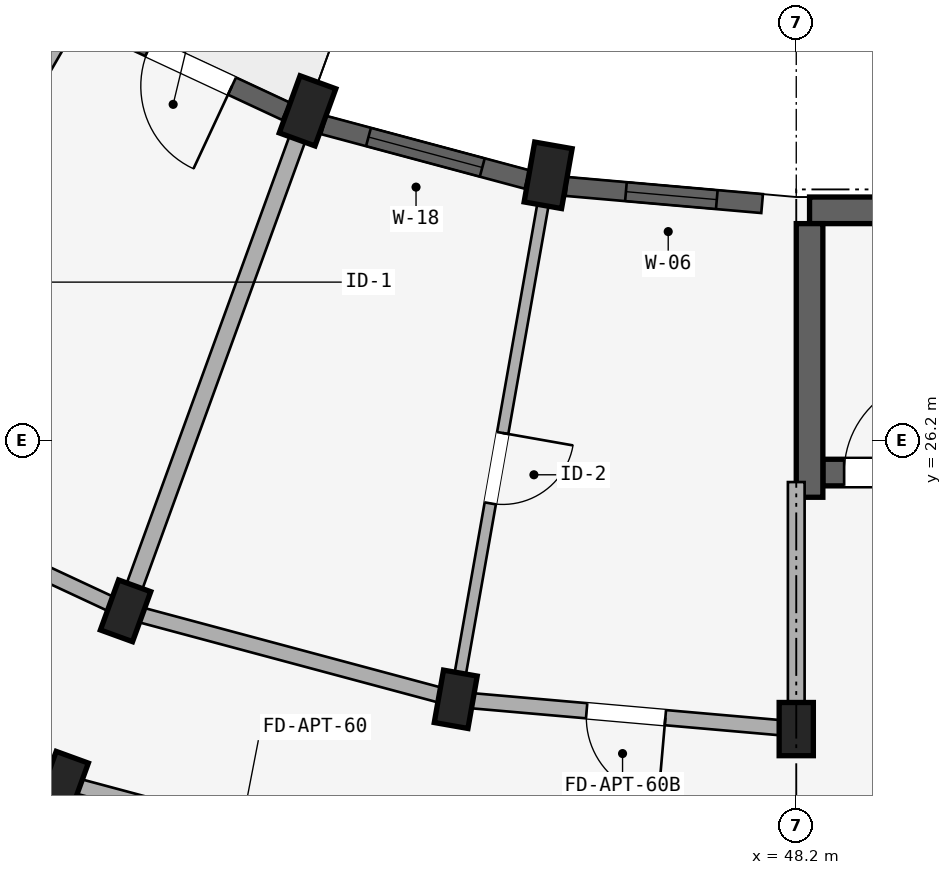
"""IFC4 building model, lengths in metres.
Left out: names, types, materials, properties, quantities, classifications, styles, units other than length and angle.
Written with IfcOpenShell. Run it as: python <this file> out.ifc"""

import sys

from ifc_helpers import new_model, si_unit, direction, frame, frame_2d, origin, origin_2d, place, context, subcontext, project, spatial, rectangle, extrude, element, fill, save


model = new_model("IFC4")
c1 = context("Model", 3, precision=1e-05, world=origin(), true_north=direction((0.0, 1.0)))
c2 = subcontext(c1, "Body", "Model", "MODEL_VIEW")
j1 = project(units=[si_unit("LENGTHUNIT", "METRE"), si_unit("PLANEANGLEUNIT", "RADIAN")], contexts=[c1])
p1 = place(None, origin())
s1 = spatial("IfcSite", under=j1, at=p1, CompositionType="ELEMENT")
p2 = place(p1, origin())
s2 = spatial("IfcBuilding", under=s1, at=p2, CompositionType="ELEMENT")
p3 = place(p2, frame((0.0, 0.0, 18.15)))
s3 = spatial("IfcBuildingStorey", under=s2, at=p3, CompositionType="ELEMENT", Elevation=18.15)
p4 = place(p3, frame((48.375, 29.225, 0.0), z_axis=(0.0, 0.0, 1.0), x_axis=(1.0, 0.0, 0.0)))
e1 = element("IfcWall", 1, at=p4, inside=s3, PredefinedType="SHEAR", context=c2, shape_type="SweptSolid", body=[
    extrude(rectangle(XDim=8.25, YDim=0.35, at=frame_2d((4.125, 0.0))), origin(), (0.0, 0.0, 1.0), 2.93),
])
p5 = place(p3, frame((48.55, 25.775, 0.0), z_axis=(0.0, 0.0, 1.0), x_axis=(1.0, 0.0, 0.0)))
e2 = element("IfcWall", 2, at=p5, inside=s3, PredefinedType="SHEAR", context=c2, shape_type="SweptSolid", body=[
    extrude(rectangle(XDim=7.9, YDim=0.35, at=frame_2d((3.95, 0.0))), origin(), (0.0, 0.0, 1.0), 2.93),
])
p6 = place(p5, frame((0.28, 0.0, 0.0)))
e3 = element("IfcOpeningElement", 3, at=p6, cuts=e2, PredefinedType="OPENING", context=c2, shape_type="SweptSolid", body=[
    extrude(rectangle(XDim=1.24, YDim=2.15, at=frame_2d((0.62, 1.075))), frame((0.0, 0.185, 0.0), z_axis=(0.0, -1.0, 0.0), x_axis=(1.0, 0.0, 0.0)), (0.0, 0.0, 1.0), 0.37),
])
p7 = place(p3, frame((48.375, 29.05, 0.0), z_axis=(0.0, 0.0, 1.0), x_axis=(0.0, -1.0, 0.0)))
e4 = element("IfcWall", 4, at=p7, inside=s3, PredefinedType="SHEAR", context=c2, shape_type="SweptSolid", body=[
    extrude(rectangle(XDim=3.6, YDim=0.35, at=frame_2d((1.8, 0.0))), origin(), (0.0, 0.0, 1.0), 2.93),
])
p8 = place(p3, frame((48.2, 22.4, 0.0), z_axis=(0.0, 0.0, 1.0), x_axis=(1.0, 0.0, 0.0)))
e5 = element("IfcColumn", 5, at=p8, inside=s3, PredefinedType="COLUMN", context=c2, shape_type="SweptSolid", body=[
    extrude(rectangle(XDim=0.45, YDim=0.7, at=origin_2d()), origin(), (0.0, 0.0, 1.0), 2.93),
])
p9 = place(p3, frame((44.935, 29.686, 0.0), z_axis=(0.0, 0.0, 1.0), x_axis=(-0.984807753012, 0.173648177667, 0.0)))
e6 = element("IfcColumn", 6, at=p9, inside=s3, PredefinedType="COLUMN", context=c2, shape_type="SweptSolid", body=[
    extrude(rectangle(XDim=0.5, YDim=0.8, at=origin_2d()), origin(), (0.0, 0.0, 1.0), 2.93),
])
p10 = place(p3, frame((43.72, 22.792, 0.0), z_axis=(0.0, 0.0, 1.0), x_axis=(-0.984807753012, 0.173648177667, 0.0)))
e7 = element("IfcColumn", 7, at=p10, inside=s3, PredefinedType="COLUMN", context=c2, shape_type="SweptSolid", body=[
    extrude(rectangle(XDim=0.45, YDim=0.7, at=origin_2d()), origin(), (0.0, 0.0, 1.0), 2.93),
])
p11 = place(p3, frame((41.77, 30.534, 0.0), z_axis=(0.0, 0.0, 1.0), x_axis=(-0.939692620786, 0.342020143326, 0.0)))
e8 = element("IfcColumn", 8, at=p11, inside=s3, PredefinedType="COLUMN", context=c2, shape_type="SweptSolid", body=[
    extrude(rectangle(XDim=0.5, YDim=0.8, at=origin_2d()), origin(), (0.0, 0.0, 1.0), 2.93),
])
for number, where, z_axis, x_axis in (
    (9, (39.376, 23.956, 0.0), (0.0, 0.0, 1.0), (-0.94, 0.342, 0.0)),
    (10, (38.555, 21.701, 0.0), (0.0, 0.0, 1.0), (-0.94, 0.342, 0.0)),
):
    element("IfcColumn", number, at=place(p3, frame(where, z_axis=z_axis, x_axis=x_axis)), inside=s3, PredefinedType="COLUMN", context=c2, shape_type="SweptSolid", body=[
        extrude(rectangle(XDim=0.45, YDim=0.7, at=origin_2d()), origin(), (0.0, 0.0, 1.0), 2.93),
    ])
p12 = place(p3, frame((48.2, 22.4, 0.0), z_axis=(0.0, 0.0, 1.0), x_axis=(-0.996191949488, 0.087187153726, 0.0)))
e11 = element("IfcWall", 11, at=p12, inside=s3, PredefinedType="STANDARD", context=c2, shape_type="SweptSolid", body=[
    extrude(rectangle(XDim=4.497, YDim=0.2, at=frame_2d((2.249, 0.0))), origin(), (0.0, 0.0, 1.0), 2.372),
])
p13 = place(p12, frame((1.729, 0.0, 0.0)))
e12 = element("IfcOpeningElement", 12, at=p13, cuts=e11, PredefinedType="OPENING", context=c2, shape_type="SweptSolid", body=[
    extrude(rectangle(XDim=1.04, YDim=2.15, at=frame_2d((0.52, 1.075))), frame((0.0, 0.11, 0.0), z_axis=(0.0, -1.0, 0.0), x_axis=(1.0, 0.0, 0.0)), (0.0, 0.0, 1.0), 0.22),
])
p14 = place(p3, frame((43.72, 22.792, 0.0), z_axis=(0.0, 0.0, 1.0), x_axis=(-0.965934240054, 0.258787642463, 0.0)))
e13 = element("IfcWall", 13, at=p14, inside=s3, PredefinedType="STANDARD", context=c2, shape_type="SweptSolid", body=[
    extrude(rectangle(XDim=4.497, YDim=0.2, at=frame_2d((2.249, 0.0))), origin(), (0.0, 0.0, 1.0), 2.372),
])
p15 = place(p3, frame((43.303, 20.428, 0.0), z_axis=(0.0, 0.0, 1.0), x_axis=(-0.965930095386, 0.258803112091, 0.0)))
e14 = element("IfcWall", 14, at=p15, inside=s3, PredefinedType="STANDARD", context=c2, shape_type="SweptSolid", body=[
    extrude(rectangle(XDim=4.916, YDim=0.2, at=frame_2d((2.458, 0.0))), origin(), (0.0, 0.0, 1.0), 2.372),
])
p16 = place(p15, frame((1.958, 0.0, 0.0)))
e15 = element("IfcOpeningElement", 15, at=p16, cuts=e14, PredefinedType="OPENING", context=c2, shape_type="SweptSolid", body=[
    extrude(rectangle(XDim=1.0, YDim=2.15, at=frame_2d((0.5, 1.075))), frame((0.0, 0.11, 0.0), z_axis=(0.0, -1.0, 0.0), x_axis=(1.0, 0.0, 0.0)), (0.0, 0.0, 1.0), 0.22),
])
p17 = place(p3, frame((39.376, 23.956, 0.0), z_axis=(0.0, 0.0, 1.0), x_axis=(-0.906307919131, 0.422617978463, 0.0)))
e16 = element("IfcWall", 16, at=p17, inside=s3, PredefinedType="STANDARD", context=c2, shape_type="SweptSolid", body=[
    extrude(rectangle(XDim=4.497, YDim=0.2, at=frame_2d((2.249, 0.0))), origin(), (0.0, 0.0, 1.0), 2.372),
])
p18 = place(p17, frame((1.709, 0.0, 0.0)))
e17 = element("IfcOpeningElement", 17, at=p18, cuts=e16, PredefinedType="OPENING", context=c2, shape_type="SweptSolid", body=[
    extrude(rectangle(XDim=1.08, YDim=2.15, at=frame_2d((0.54, 1.075))), frame((0.0, 0.11, 0.0), z_axis=(0.0, -1.0, 0.0), x_axis=(1.0, 0.0, 0.0)), (0.0, 0.0, 1.0), 0.22),
])
p19 = place(p3, frame((38.555, 21.701, 0.0), z_axis=(0.0, 0.0, 1.0), x_axis=(-0.906302381024, 0.422629854778, 0.0)))
e18 = element("IfcWall", 18, at=p19, inside=s3, PredefinedType="STANDARD", context=c2, shape_type="SweptSolid", body=[
    extrude(rectangle(XDim=4.915, YDim=0.2, at=frame_2d((2.458, 0.0))), origin(), (0.0, 0.0, 1.0), 2.372),
])
p20 = place(p3, frame((48.2, 25.65, 0.0), z_axis=(0.0, 0.0, 1.0), x_axis=(0.0, -1.0, 0.0)))
e19 = element("IfcWall", 19, at=p20, inside=s3, PredefinedType="STANDARD", context=c2, shape_type="SweptSolid", body=[
    extrude(rectangle(XDim=3.2, YDim=0.22, at=frame_2d((1.6, 0.0))), origin(), (0.0, 0.0, 1.0), 2.372),
])
p21 = place(p3, frame((44.901, 29.489, 0.0), z_axis=(0.0, 0.0, 1.0), x_axis=(-0.173647089161, -0.984807944945, 0.0)))
e20 = element("IfcWall", 20, at=p21, inside=s3, PredefinedType="PARTITIONING", context=c2, shape_type="SweptSolid", body=[
    extrude(rectangle(XDim=6.75, YDim=0.15, at=frame_2d((3.375, 0.0))), origin(), (0.0, 0.0, 1.0), 2.372),
])
p22 = place(p21, frame((3.242, 0.0, 0.0)))
e21 = element("IfcOpeningElement", 21, at=p22, cuts=e20, PredefinedType="OPENING", context=c2, shape_type="SweptSolid", body=[
    extrude(rectangle(XDim=0.94, YDim=2.1, at=frame_2d((0.47, 1.05))), frame((0.0, 0.085, 0.0), z_axis=(0.0, -1.0, 0.0), x_axis=(1.0, 0.0, 0.0)), (0.0, 0.0, 1.0), 0.17),
])
p23 = place(p3, frame((41.702, 30.346, 0.0), z_axis=(0.0, 0.0, 1.0), x_axis=(-0.342010221662, -0.939696231917, 0.0)))
e22 = element("IfcWall", 22, at=p23, inside=s3, PredefinedType="STANDARD", context=c2, shape_type="SweptSolid", body=[
    extrude(rectangle(XDim=6.75, YDim=0.22, at=frame_2d((3.375, 0.0))), origin(), (0.0, 0.0, 1.0), 2.372),
])
p24 = place(p3, frame((38.521, 21.607, 0.0), z_axis=(0.0, 0.0, 1.0), x_axis=(-0.342022120477, -0.939691901159, 0.0)))
e23 = element("IfcWall", 23, at=p24, inside=s3, PredefinedType="PARTITIONING", context=c2, shape_type="SweptSolid", body=[
    extrude(rectangle(XDim=17.42, YDim=0.15, at=frame_2d((8.71, 0.0))), origin(), (0.0, 0.0, 1.0), 2.372),
])
p25 = place(p24, frame((4.45, 0.0, 0.0)))
e24 = element("IfcOpeningElement", 24, at=p25, cuts=e23, PredefinedType="OPENING", context=c2, shape_type="SweptSolid", body=[
    extrude(rectangle(XDim=0.8, YDim=2.1, at=frame_2d((0.4, 1.05))), frame((0.0, 0.085, 0.0), z_axis=(0.0, -1.0, 0.0), x_axis=(1.0, 0.0, 0.0)), (0.0, 0.0, 1.0), 0.17),
])
p26 = place(p3, frame((38.7, 31.746, 0.0), z_axis=(0.0, 0.0, 1.0), x_axis=(-0.499997969693, -0.866026575979, 0.0)))
e25 = element("IfcWall", 25, at=p26, inside=s3, PredefinedType="PARTITIONING", context=c2, shape_type="SweptSolid", body=[
    extrude(rectangle(XDim=6.75, YDim=0.15, at=frame_2d((3.375, 0.0))), origin(), (0.0, 0.0, 1.0), 2.372),
])
p27 = place(p26, frame((3.262, 0.0, 0.0)))
e26 = element("IfcOpeningElement", 26, at=p27, cuts=e25, PredefinedType="OPENING", context=c2, shape_type="SweptSolid", body=[
    extrude(rectangle(XDim=0.9, YDim=2.1, at=frame_2d((0.45, 1.05))), frame((0.0, 0.085, 0.0), z_axis=(0.0, -1.0, 0.0), x_axis=(1.0, 0.0, 0.0)), (0.0, 0.0, 1.0), 0.17),
])
p28 = place(p3, frame((47.751, 29.314, 0.0), z_axis=(0.0, 0.0, 1.0), x_axis=(-0.996188278786, 0.087229084652, 0.0)))
e27 = element("IfcWall", 27, at=p28, inside=s3, PredefinedType="STANDARD", context=c2, shape_type="SweptSolid", body=[
    extrude(rectangle(XDim=2.583, YDim=0.25, at=frame_2d((1.292, 0.0))), origin(), (0.0, 0.0, 1.0), 2.422),
])
p29 = place(p28, frame((0.599, 0.0, 0.722)))
e28 = element("IfcOpeningElement", 28, at=p29, cuts=e27, PredefinedType="OPENING", context=c2, shape_type="SweptSolid", body=[
    extrude(rectangle(XDim=1.2, YDim=1.5, at=frame_2d((0.6, 0.75))), frame((0.0, 0.135, 0.0), z_axis=(0.0, -1.0, 0.0), x_axis=(1.0, 0.0, 0.0)), (0.0, 0.0, 1.0), 0.27),
])
p30 = place(p3, frame((44.658, 29.631, 0.0), z_axis=(0.0, 0.0, 1.0), x_axis=(-0.965935855992, 0.25878161084, 0.0)))
e29 = element("IfcWall", 29, at=p30, inside=s3, PredefinedType="STANDARD", context=c2, shape_type="SweptSolid", body=[
    extrude(rectangle(XDim=2.77, YDim=0.25, at=frame_2d((1.385, 0.0))), origin(), (0.0, 0.0, 1.0), 2.422),
])
p31 = place(p30, frame((0.61, 0.0, 0.622)))
e30 = element("IfcOpeningElement", 30, at=p31, cuts=e29, PredefinedType="OPENING", context=c2, shape_type="SweptSolid", body=[
    extrude(rectangle(XDim=1.55, YDim=1.6, at=frame_2d((0.775, 0.8))), frame((0.0, 0.135, 0.0), z_axis=(0.0, -1.0, 0.0), x_axis=(1.0, 0.0, 0.0)), (0.0, 0.0, 1.0), 0.27),
])
p32 = place(p3, frame((41.487, 30.528, 0.0), z_axis=(0.0, 0.0, 1.0), x_axis=(-0.906293449611, 0.422649007088, 0.0)))
e31 = element("IfcWall", 31, at=p32, inside=s3, PredefinedType="STANDARD", context=c2, shape_type="SweptSolid", body=[
    extrude(rectangle(XDim=2.77, YDim=0.25, at=frame_2d((1.385, 0.0))), origin(), (0.0, 0.0, 1.0), 2.422),
])
p33 = place(p32, frame((0.785, 0.0, 0.0)))
e32 = element("IfcOpeningElement", 32, at=p33, cuts=e31, PredefinedType="OPENING", context=c2, shape_type="SweptSolid", body=[
    extrude(rectangle(XDim=1.2, YDim=2.15, at=frame_2d((0.6, 1.075))), frame((0.0, 0.135, 0.0), z_axis=(0.0, -1.0, 0.0), x_axis=(1.0, 0.0, 0.0)), (0.0, 0.0, 1.0), 0.27),
])
p34 = place(p29, origin())
e33 = element("IfcWindow", 33, at=p34, inside=s3, PartitioningType="SINGLE_PANEL", PredefinedType="WINDOW", context=c2, shape_type="SweptSolid", body=[
    extrude(rectangle(XDim=1.2, YDim=1.5, at=frame_2d((0.6, 0.75))), frame((0.0, 0.03, 0.0), z_axis=(0.0, -1.0, 0.0), x_axis=(1.0, 0.0, 0.0)), (0.0, 0.0, 1.0), 0.06),
])
fill(e28, e33)
p35 = place(p31, origin())
e34 = element("IfcWindow", 34, at=p35, inside=s3, PartitioningType="DOUBLE_PANEL_VERTICAL", PredefinedType="WINDOW", context=c2, shape_type="SweptSolid", body=[
    extrude(rectangle(XDim=1.55, YDim=1.6, at=frame_2d((0.775, 0.8))), frame((0.0, 0.03, 0.0), z_axis=(0.0, -1.0, 0.0), x_axis=(1.0, 0.0, 0.0)), (0.0, 0.0, 1.0), 0.06),
])
fill(e30, e34)
p36 = place(p6, origin())
e35 = element("IfcDoor", 35, at=p36, inside=s3, OperationType="SINGLE_SWING_RIGHT", PredefinedType="DOOR", context=c2, shape_type="SweptSolid", body=[
    extrude(rectangle(XDim=1.24, YDim=2.15, at=frame_2d((0.62, 1.075))), frame((0.0, 0.025, 0.0), z_axis=(0.0, -1.0, 0.0), x_axis=(1.0, 0.0, 0.0)), (0.0, 0.0, 1.0), 0.05),
])
fill(e3, e35)
p37 = place(p22, frame((0.94, 0.0, 0.0), z_axis=(0.0, 0.0, 1.0), x_axis=(-1.0, 0.0, 0.0)))
e36 = element("IfcDoor", 36, at=p37, inside=s3, OperationType="SINGLE_SWING_RIGHT", PredefinedType="DOOR", context=c2, shape_type="SweptSolid", body=[
    extrude(rectangle(XDim=0.94, YDim=2.1, at=frame_2d((0.47, 1.05))), frame((0.0, 0.025, 0.0), z_axis=(0.0, -1.0, 0.0), x_axis=(1.0, 0.0, 0.0)), (0.0, 0.0, 1.0), 0.05),
])
fill(e21, e36)
p38 = place(p13, frame((1.04, 0.0, 0.0), z_axis=(0.0, 0.0, 1.0), x_axis=(-1.0, 0.0, 0.0)))
e37 = element("IfcDoor", 37, at=p38, inside=s3, OperationType="SINGLE_SWING_RIGHT", PredefinedType="DOOR", context=c2, shape_type="SweptSolid", body=[
    extrude(rectangle(XDim=1.04, YDim=2.15, at=frame_2d((0.52, 1.075))), frame((0.0, 0.025, 0.0), z_axis=(0.0, -1.0, 0.0), x_axis=(1.0, 0.0, 0.0)), (0.0, 0.0, 1.0), 0.05),
])
fill(e12, e37)
p39 = place(p33, frame((1.2, 0.0, 0.0), z_axis=(0.0, 0.0, 1.0), x_axis=(-1.0, 0.0, 0.0)))
e38 = element("IfcDoor", 38, at=p39, inside=s3, OperationType="SINGLE_SWING_RIGHT", PredefinedType="DOOR", context=c2, shape_type="SweptSolid", body=[
    extrude(rectangle(XDim=1.2, YDim=2.15, at=frame_2d((0.6, 1.075))), frame((0.0, 0.025, 0.0), z_axis=(0.0, -1.0, 0.0), x_axis=(1.0, 0.0, 0.0)), (0.0, 0.0, 1.0), 0.05),
])
fill(e32, e38)
save(model, sys.argv[1])
